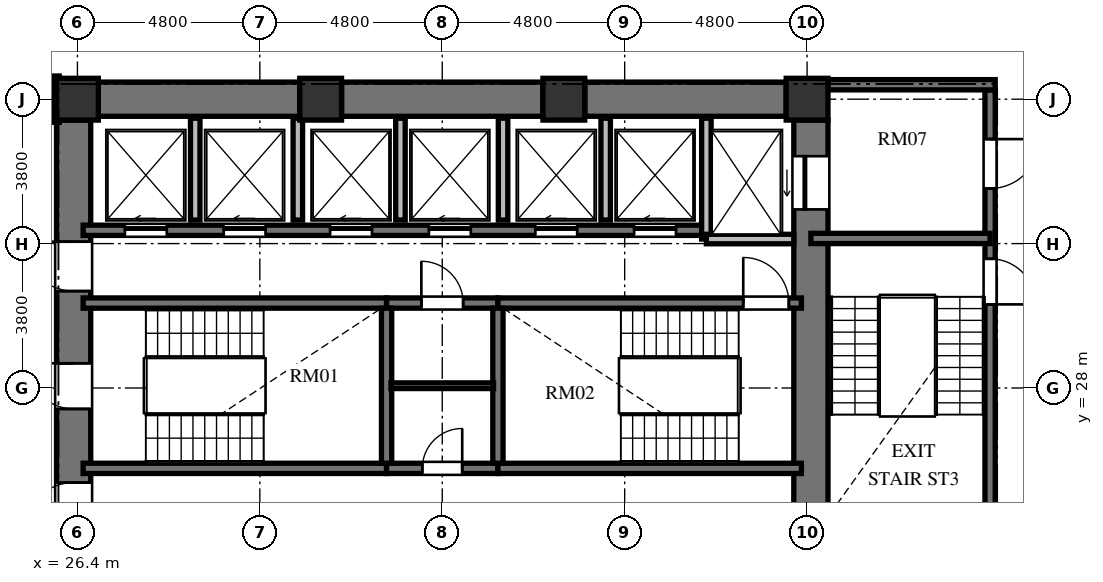
"""IFC4 building model, lengths in metres.
Left out: names, types, materials, properties, quantities, classifications, styles, units other than length and angle.
Written with IfcOpenShell. Run it as: python <this file> out.ifc"""

import sys

from ifc_helpers import new_model, si_unit, direction, frame, frame_2d, origin, origin_2d, place, context, subcontext, project, spatial, rectangle, extrude, element, fill, save


model = new_model("IFC4")
c1 = context("Model", 3, precision=1e-05, world=origin(), true_north=direction((0.0, 1.0)))
c2 = subcontext(c1, "Body", "Model", "MODEL_VIEW")
j1 = project(units=[si_unit("LENGTHUNIT", "METRE"), si_unit("PLANEANGLEUNIT", "RADIAN")], contexts=[c1])
p1 = place(None, origin())
s1 = spatial("IfcSite", under=j1, at=p1, CompositionType="ELEMENT")
p2 = place(p1, origin())
s2 = spatial("IfcBuilding", under=s1, at=p2, CompositionType="ELEMENT")
p3 = place(p2, frame((0.0, 0.0, 36.144)))
s3 = spatial("IfcBuildingStorey", under=s2, at=p3, CompositionType="ELEMENT", Elevation=36.144)
for number, where, z_axis, x_axis in (
    (1, (45.6, 35.6, 0.0), (0.0, 0.0, 1.0), (1.0, 0.0, 0.0)),
    (2, (39.2, 35.6, 0.0), (0.0, 0.0, 1.0), (1.0, 0.0, 0.0)),
    (3, (32.8, 35.6, 0.0), (0.0, 0.0, 1.0), (1.0, 0.0, 0.0)),
    (4, (26.4, 35.6, 0.0), (0.0, 0.0, 1.0), (1.0, 0.0, 0.0)),
):
    element("IfcColumn", number, at=place(p3, frame(where, z_axis=z_axis, x_axis=x_axis)), inside=s3, PredefinedType="COLUMN", context=c2, shape_type="SweptSolid", body=[
        extrude(rectangle(XDim=1.1, YDim=1.1, at=origin_2d()), origin(), (0.0, 0.0, 1.0), 3.648),
    ])
p4 = place(p3, frame((26.3, 20.95, 0.0), z_axis=(0.0, 0.0, 1.0), x_axis=(0.0, 1.0, 0.0)))
e5 = element("IfcWall", 5, at=p4, inside=s3, PredefinedType="SHEAR", context=c2, shape_type="SweptSolid", body=[
    extrude(rectangle(XDim=14.1, YDim=0.9, at=frame_2d((7.05, 0.0))), origin(), (0.0, 0.0, 1.0), 3.648),
])
p5 = place(p4, frame((6.5, 0.0, 0.0)))
e6 = element("IfcOpeningElement", 6, at=p5, cuts=e5, PredefinedType="OPENING", context=c2, shape_type="SweptSolid", body=[
    extrude(rectangle(XDim=1.2, YDim=2.15, at=frame_2d((0.6, 1.075))), frame((0.0, 0.46, 0.0), z_axis=(0.0, -1.0, 0.0), x_axis=(1.0, 0.0, 0.0)), (0.0, 0.0, 1.0), 0.92),
])
p6 = place(p4, frame((9.6, 0.0, 0.0)))
e7 = element("IfcOpeningElement", 7, at=p6, cuts=e5, PredefinedType="OPENING", context=c2, shape_type="SweptSolid", body=[
    extrude(rectangle(XDim=1.3, YDim=2.2, at=frame_2d((0.65, 1.1))), frame((0.0, 0.46, 0.0), z_axis=(0.0, -1.0, 0.0), x_axis=(1.0, 0.0, 0.0)), (0.0, 0.0, 1.0), 0.92),
])
p7 = place(p4, frame((3.26, 0.0, 0.0)))
e8 = element("IfcOpeningElement", 8, at=p7, cuts=e5, PredefinedType="OPENING", context=c2, shape_type="SweptSolid", body=[
    extrude(rectangle(XDim=1.3, YDim=2.2, at=frame_2d((0.65, 1.1))), frame((0.0, 0.46, 0.0), z_axis=(0.0, -1.0, 0.0), x_axis=(1.0, 0.0, 0.0)), (0.0, 0.0, 1.0), 0.92),
])
p8 = place(p3, frame((45.7, 20.95, 0.0), z_axis=(0.0, 0.0, 1.0), x_axis=(0.0, 1.0, 0.0)))
e9 = element("IfcWall", 9, at=p8, inside=s3, PredefinedType="SHEAR", context=c2, shape_type="SweptSolid", body=[
    extrude(rectangle(XDim=14.1, YDim=0.9, at=frame_2d((7.05, 0.0))), origin(), (0.0, 0.0, 1.0), 3.648),
])
p9 = place(p8, frame((11.75, 0.0, 0.0)))
e10 = element("IfcOpeningElement", 10, at=p9, cuts=e9, PredefinedType="OPENING", context=c2, shape_type="SweptSolid", body=[
    extrude(rectangle(XDim=1.4, YDim=2.3, at=frame_2d((0.7, 1.15))), frame((0.0, 0.46, 0.0), z_axis=(0.0, -1.0, 0.0), x_axis=(1.0, 0.0, 0.0)), (0.0, 0.0, 1.0), 0.92),
])
p10 = place(p8, frame((0.95, 0.0, 0.0)))
e11 = element("IfcOpeningElement", 11, at=p10, cuts=e9, PredefinedType="OPENING", context=c2, shape_type="SweptSolid", body=[
    extrude(rectangle(XDim=1.4, YDim=2.3, at=frame_2d((0.7, 1.15))), frame((0.0, 0.46, 0.0), z_axis=(0.0, -1.0, 0.0), x_axis=(1.0, 0.0, 0.0)), (0.0, 0.0, 1.0), 0.92),
])
p11 = place(p3, frame((26.95, 35.6, 0.0), z_axis=(0.0, 0.0, 1.0), x_axis=(1.0, 0.0, 0.0)))
e12 = element("IfcWall", 12, at=p11, inside=s3, PredefinedType="SHEAR", context=c2, shape_type="SweptSolid", body=[
    extrude(rectangle(XDim=5.3, YDim=0.9, at=frame_2d((2.65, 0.0))), origin(), (0.0, 0.0, 1.0), 3.648),
])
p12 = place(p3, frame((33.35, 35.6, 0.0), z_axis=(0.0, 0.0, 1.0), x_axis=(1.0, 0.0, 0.0)))
e13 = element("IfcWall", 13, at=p12, inside=s3, PredefinedType="SHEAR", context=c2, shape_type="SweptSolid", body=[
    extrude(rectangle(XDim=5.3, YDim=0.9, at=frame_2d((2.65, 0.0))), origin(), (0.0, 0.0, 1.0), 3.648),
])
p13 = place(p3, frame((39.75, 35.6, 0.0), z_axis=(0.0, 0.0, 1.0), x_axis=(1.0, 0.0, 0.0)))
e14 = element("IfcWall", 14, at=p13, inside=s3, PredefinedType="SHEAR", context=c2, shape_type="SweptSolid", body=[
    extrude(rectangle(XDim=5.3, YDim=0.9, at=frame_2d((2.65, 0.0))), origin(), (0.0, 0.0, 1.0), 3.648),
])
p14 = place(p3, frame((26.55, 30.235, 0.0), z_axis=(0.0, 0.0, 1.0), x_axis=(1.0, 0.0, 0.0)))
e15 = element("IfcWall", 15, at=p14, inside=s3, PredefinedType="SHEAR", context=c2, shape_type="SweptSolid", body=[
    extrude(rectangle(XDim=7.985, YDim=0.27, at=frame_2d((3.992, 0.0))), origin(), (0.0, 0.0, 1.0), 3.648),
])
p15 = place(p3, frame((34.535, 30.235, 0.0), z_axis=(0.0, 0.0, 1.0), x_axis=(1.0, 0.0, 0.0)))
e16 = element("IfcWall", 16, at=p15, inside=s3, PredefinedType="SHEAR", context=c2, shape_type="SweptSolid", body=[
    extrude(rectangle(XDim=2.93, YDim=0.27, at=frame_2d((1.465, 0.0))), origin(), (0.0, 0.0, 1.0), 3.648),
])
p16 = place(p15, frame((0.915, 0.0, 0.0)))
e17 = element("IfcOpeningElement", 17, at=p16, cuts=e16, PredefinedType="OPENING", context=c2, shape_type="SweptSolid", body=[
    extrude(rectangle(XDim=1.1, YDim=2.15, at=frame_2d((0.55, 1.075))), frame((0.0, 0.145, 0.0), z_axis=(0.0, -1.0, 0.0), x_axis=(1.0, 0.0, 0.0)), (0.0, 0.0, 1.0), 0.29),
])
p17 = place(p3, frame((37.465, 30.235, 0.0), z_axis=(0.0, 0.0, 1.0), x_axis=(1.0, 0.0, 0.0)))
e18 = element("IfcWall", 18, at=p17, inside=s3, PredefinedType="SHEAR", context=c2, shape_type="SweptSolid", body=[
    extrude(rectangle(XDim=7.985, YDim=0.27, at=frame_2d((3.992, 0.0))), origin(), (0.0, 0.0, 1.0), 3.648),
])
p18 = place(p17, frame((6.455, 0.0, 0.0)))
e19 = element("IfcOpeningElement", 19, at=p18, cuts=e18, PredefinedType="OPENING", context=c2, shape_type="SweptSolid", body=[
    extrude(rectangle(XDim=1.2, YDim=2.15, at=frame_2d((0.6, 1.075))), frame((0.0, 0.145, 0.0), z_axis=(0.0, -1.0, 0.0), x_axis=(1.0, 0.0, 0.0)), (0.0, 0.0, 1.0), 0.29),
])
p19 = place(p3, frame((26.55, 25.885, 0.0), z_axis=(0.0, 0.0, 1.0), x_axis=(1.0, 0.0, 0.0)))
e20 = element("IfcWall", 20, at=p19, inside=s3, PredefinedType="SHEAR", context=c2, shape_type="SweptSolid", body=[
    extrude(rectangle(XDim=7.985, YDim=0.27, at=frame_2d((3.992, 0.0))), origin(), (0.0, 0.0, 1.0), 3.648),
])
p20 = place(p3, frame((34.535, 25.885, 0.0), z_axis=(0.0, 0.0, 1.0), x_axis=(1.0, 0.0, 0.0)))
e21 = element("IfcWall", 21, at=p20, inside=s3, PredefinedType="SHEAR", context=c2, shape_type="SweptSolid", body=[
    extrude(rectangle(XDim=2.93, YDim=0.27, at=frame_2d((1.465, 0.0))), origin(), (0.0, 0.0, 1.0), 3.648),
])
p21 = place(p20, frame((0.94, 0.0, 0.0)))
e22 = element("IfcOpeningElement", 22, at=p21, cuts=e21, PredefinedType="OPENING", context=c2, shape_type="SweptSolid", body=[
    extrude(rectangle(XDim=1.05, YDim=2.15, at=frame_2d((0.525, 1.075))), frame((0.0, 0.145, 0.0), z_axis=(0.0, -1.0, 0.0), x_axis=(1.0, 0.0, 0.0)), (0.0, 0.0, 1.0), 0.29),
])
p22 = place(p3, frame((37.465, 25.885, 0.0), z_axis=(0.0, 0.0, 1.0), x_axis=(1.0, 0.0, 0.0)))
e23 = element("IfcWall", 23, at=p22, inside=s3, PredefinedType="SHEAR", context=c2, shape_type="SweptSolid", body=[
    extrude(rectangle(XDim=7.985, YDim=0.27, at=frame_2d((3.992, 0.0))), origin(), (0.0, 0.0, 1.0), 3.648),
])
for number, where, z_axis, x_axis in (
    (24, (34.535, 26.02, 0.0), (0.0, 0.0, 1.0), (0.0, 1.0, 0.0)),
    (25, (37.465, 26.02, 0.0), (0.0, 0.0, 1.0), (0.0, 1.0, 0.0)),
):
    element("IfcWall", number, at=place(p3, frame(where, z_axis=z_axis, x_axis=x_axis)), inside=s3, PredefinedType="SHEAR", context=c2, shape_type="SweptSolid", body=[
        extrude(rectangle(XDim=4.08, YDim=0.27, at=frame_2d((2.04, 0.0))), origin(), (0.0, 0.0, 1.0), 3.648),
    ])
p23 = place(p3, frame((34.65, 28.06, 0.0), z_axis=(0.0, 0.0, 1.0), x_axis=(1.0, 0.0, 0.0)))
e26 = element("IfcWall", 26, at=p23, inside=s3, PredefinedType="PARTITIONING", context=c2, shape_type="SweptSolid", body=[
    extrude(rectangle(XDim=2.7, YDim=0.15, at=frame_2d((1.35, 0.0))), origin(), (0.0, 0.0, 1.0), 3.428),
])
p24 = place(p3, frame((26.55, 32.15, 0.0), z_axis=(0.0, 0.0, 1.0), x_axis=(1.0, 0.0, 0.0)))
e27 = element("IfcWall", 27, at=p24, inside=s3, PredefinedType="SHEAR", context=c2, shape_type="SweptSolid", body=[
    extrude(rectangle(XDim=16.4, YDim=0.27, at=frame_2d((8.2, 0.0))), origin(), (0.0, 0.0, 1.0), 3.648),
])
p25 = place(p24, frame((1.1, 0.0, 0.0)))
e28 = element("IfcOpeningElement", 28, at=p25, cuts=e27, PredefinedType="OPENING", context=c2, shape_type="SweptSolid", body=[
    extrude(rectangle(XDim=1.1, YDim=2.2, at=frame_2d((0.55, 1.1))), frame((0.0, 0.145, 0.0), z_axis=(0.0, -1.0, 0.0), x_axis=(1.0, 0.0, 0.0)), (0.0, 0.0, 1.0), 0.29),
])
p26 = place(p24, frame((3.7, 0.0, 0.0)))
e29 = element("IfcOpeningElement", 29, at=p26, cuts=e27, PredefinedType="OPENING", context=c2, shape_type="SweptSolid", body=[
    extrude(rectangle(XDim=1.1, YDim=2.2, at=frame_2d((0.55, 1.1))), frame((0.0, 0.145, 0.0), z_axis=(0.0, -1.0, 0.0), x_axis=(1.0, 0.0, 0.0)), (0.0, 0.0, 1.0), 0.29),
])
p27 = place(p24, frame((6.5, 0.0, 0.0)))
e30 = element("IfcOpeningElement", 30, at=p27, cuts=e27, PredefinedType="OPENING", context=c2, shape_type="SweptSolid", body=[
    extrude(rectangle(XDim=1.1, YDim=2.2, at=frame_2d((0.55, 1.1))), frame((0.0, 0.145, 0.0), z_axis=(0.0, -1.0, 0.0), x_axis=(1.0, 0.0, 0.0)), (0.0, 0.0, 1.0), 0.29),
])
p28 = place(p24, frame((9.1, 0.0, 0.0)))
e31 = element("IfcOpeningElement", 31, at=p28, cuts=e27, PredefinedType="OPENING", context=c2, shape_type="SweptSolid", body=[
    extrude(rectangle(XDim=1.1, YDim=2.2, at=frame_2d((0.55, 1.1))), frame((0.0, 0.145, 0.0), z_axis=(0.0, -1.0, 0.0), x_axis=(1.0, 0.0, 0.0)), (0.0, 0.0, 1.0), 0.29),
])
p29 = place(p24, frame((11.9, 0.0, 0.0)))
e32 = element("IfcOpeningElement", 32, at=p29, cuts=e27, PredefinedType="OPENING", context=c2, shape_type="SweptSolid", body=[
    extrude(rectangle(XDim=1.1, YDim=2.2, at=frame_2d((0.55, 1.1))), frame((0.0, 0.145, 0.0), z_axis=(0.0, -1.0, 0.0), x_axis=(1.0, 0.0, 0.0)), (0.0, 0.0, 1.0), 0.29),
])
p30 = place(p24, frame((14.5, 0.0, 0.0)))
e33 = element("IfcOpeningElement", 33, at=p30, cuts=e27, PredefinedType="OPENING", context=c2, shape_type="SweptSolid", body=[
    extrude(rectangle(XDim=1.1, YDim=2.2, at=frame_2d((0.55, 1.1))), frame((0.0, 0.145, 0.0), z_axis=(0.0, -1.0, 0.0), x_axis=(1.0, 0.0, 0.0)), (0.0, 0.0, 1.0), 0.29),
])
p31 = place(p3, frame((42.95, 31.92, 0.0), z_axis=(0.0, 0.0, 1.0), x_axis=(0.0, 1.0, 0.0)))
e34 = element("IfcWall", 34, at=p31, inside=s3, PredefinedType="SOLIDWALL", context=c2, shape_type="SweptSolid", body=[
    extrude(rectangle(XDim=3.18, YDim=0.25, at=frame_2d((1.59, 0.0))), origin(), (0.0, 0.0, 1.0), 3.428),
])
p32 = place(p3, frame((42.95, 31.92, 0.0), z_axis=(0.0, 0.0, 1.0), x_axis=(1.0, 0.0, 0.0)))
e35 = element("IfcWall", 35, at=p32, inside=s3, PredefinedType="SOLIDWALL", context=c2, shape_type="SweptSolid", body=[
    extrude(rectangle(XDim=2.3, YDim=0.25, at=frame_2d((1.15, 0.0))), origin(), (0.0, 0.0, 1.0), 3.428),
])
for number, where, z_axis, x_axis in (
    (36, (29.5, 32.42, 0.0), (0.0, 0.0, 1.0), (0.0, 1.0, 0.0)),
    (37, (32.2, 32.42, 0.0), (0.0, 0.0, 1.0), (0.0, 1.0, 0.0)),
    (38, (34.9, 32.42, 0.0), (0.0, 0.0, 1.0), (0.0, 1.0, 0.0)),
    (39, (37.6, 32.42, 0.0), (0.0, 0.0, 1.0), (0.0, 1.0, 0.0)),
    (40, (40.3, 32.42, 0.0), (0.0, 0.0, 1.0), (0.0, 1.0, 0.0)),
):
    element("IfcWall", number, at=place(p3, frame(where, z_axis=z_axis, x_axis=x_axis)), inside=s3, PredefinedType="SOLIDWALL", context=c2, shape_type="SweptSolid", body=[
        extrude(rectangle(XDim=2.68, YDim=0.25, at=frame_2d((1.34, 0.0))), origin(), (0.0, 0.0, 1.0), 3.428),
    ])
p33 = place(p3, frame((50.415, 35.845, 0.0), z_axis=(0.0, 0.0, 1.0), x_axis=(0.0, -1.0, 0.0)))
e41 = element("IfcWall", 41, at=p33, inside=s3, PredefinedType="SHEAR", context=c2, shape_type="SweptSolid", body=[
    extrude(rectangle(XDim=15.825, YDim=0.27, at=frame_2d((7.913, 0.0))), origin(), (0.0, 0.0, 1.0), 3.648),
])
p34 = place(p33, frame((4.445, 0.0, 0.0)))
e42 = element("IfcOpeningElement", 42, at=p34, cuts=e41, PredefinedType="OPENING", context=c2, shape_type="SweptSolid", body=[
    extrude(rectangle(XDim=1.2, YDim=2.15, at=frame_2d((0.6, 1.075))), frame((0.0, 0.145, 0.0), z_axis=(0.0, -1.0, 0.0), x_axis=(1.0, 0.0, 0.0)), (0.0, 0.0, 1.0), 0.29),
])
p35 = place(p33, frame((1.295, 0.0, 0.0)))
e43 = element("IfcOpeningElement", 43, at=p35, cuts=e41, PredefinedType="OPENING", context=c2, shape_type="SweptSolid", body=[
    extrude(rectangle(XDim=1.3, YDim=2.2, at=frame_2d((0.65, 1.1))), frame((0.0, 0.145, 0.0), z_axis=(0.0, -1.0, 0.0), x_axis=(1.0, 0.0, 0.0)), (0.0, 0.0, 1.0), 0.29),
])
p36 = place(p33, frame((13.095, 0.0, 0.0)))
e44 = element("IfcOpeningElement", 44, at=p36, cuts=e41, PredefinedType="OPENING", context=c2, shape_type="SweptSolid", body=[
    extrude(rectangle(XDim=1.3, YDim=2.2, at=frame_2d((0.65, 1.1))), frame((0.0, 0.145, 0.0), z_axis=(0.0, -1.0, 0.0), x_axis=(1.0, 0.0, 0.0)), (0.0, 0.0, 1.0), 0.29),
])
p37 = place(p3, frame((46.15, 35.98, 0.0), z_axis=(0.0, 0.0, 1.0), x_axis=(1.0, 0.0, 0.0)))
e45 = element("IfcWall", 45, at=p37, inside=s3, PredefinedType="SHEAR", context=c2, shape_type="SweptSolid", body=[
    extrude(rectangle(XDim=4.4, YDim=0.27, at=frame_2d((2.2, 0.0))), origin(), (0.0, 0.0, 1.0), 3.648),
])
p38 = place(p3, frame((45.7, 31.935, 0.0), z_axis=(0.0, 0.0, 1.0), x_axis=(1.0, 0.0, 0.0)))
e46 = element("IfcWall", 46, at=p38, inside=s3, PredefinedType="SHEAR", context=c2, shape_type="SweptSolid", body=[
    extrude(rectangle(XDim=4.715, YDim=0.27, at=frame_2d((2.357, 0.0))), origin(), (0.0, 0.0, 1.0), 3.648),
])
p39 = place(p3, frame((25.83, 36.21, 0.0), z_axis=(0.0, 0.0, 1.0), x_axis=(0.0, -1.0, 0.0)))
e47 = element("IfcWall", 47, at=p39, inside=s3, PredefinedType="PARTITIONING", context=c2, shape_type="SweptSolid", body=[
    extrude(rectangle(XDim=1.22, YDim=0.18, at=frame_2d((0.61, 0.0))), origin(), (0.0, 0.0, 1.0), 3.428),
])
p40 = place(p5, origin())
e48 = element("IfcDoor", 48, at=p40, inside=s3, OperationType="SINGLE_SWING_RIGHT", PredefinedType="DOOR", context=c2, shape_type="SweptSolid", body=[
    extrude(rectangle(XDim=1.2, YDim=2.15, at=frame_2d((0.6, 1.075))), frame((0.0, 0.025, 0.0), z_axis=(0.0, -1.0, 0.0), x_axis=(1.0, 0.0, 0.0)), (0.0, 0.0, 1.0), 0.05),
])
fill(e6, e48)
p41 = place(p18, origin())
e49 = element("IfcDoor", 49, at=p41, inside=s3, OperationType="SINGLE_SWING_LEFT", PredefinedType="DOOR", context=c2, shape_type="SweptSolid", body=[
    extrude(rectangle(XDim=1.2, YDim=2.15, at=frame_2d((0.6, 1.075))), frame((0.0, 0.025, 0.0), z_axis=(0.0, -1.0, 0.0), x_axis=(1.0, 0.0, 0.0)), (0.0, 0.0, 1.0), 0.05),
])
fill(e19, e49)
p42 = place(p21, origin())
e50 = element("IfcDoor", 50, at=p42, inside=s3, OperationType="SINGLE_SWING_RIGHT", PredefinedType="DOOR", context=c2, shape_type="SweptSolid", body=[
    extrude(rectangle(XDim=1.05, YDim=2.15, at=frame_2d((0.525, 1.075))), frame((0.0, 0.025, 0.0), z_axis=(0.0, -1.0, 0.0), x_axis=(1.0, 0.0, 0.0)), (0.0, 0.0, 1.0), 0.05),
])
fill(e22, e50)
p43 = place(p16, origin())
e51 = element("IfcDoor", 51, at=p43, inside=s3, OperationType="SINGLE_SWING_LEFT", PredefinedType="DOOR", context=c2, shape_type="SweptSolid", body=[
    extrude(rectangle(XDim=1.1, YDim=2.15, at=frame_2d((0.55, 1.075))), frame((0.0, 0.025, 0.0), z_axis=(0.0, -1.0, 0.0), x_axis=(1.0, 0.0, 0.0)), (0.0, 0.0, 1.0), 0.05),
])
fill(e17, e51)
p44 = place(p6, origin())
e52 = element("IfcDoor", 52, at=p44, inside=s3, OperationType="SINGLE_SWING_RIGHT", PredefinedType="DOOR", context=c2, shape_type="SweptSolid", body=[
    extrude(rectangle(XDim=1.3, YDim=2.2, at=frame_2d((0.65, 1.1))), frame((0.0, 0.025, 0.0), z_axis=(0.0, -1.0, 0.0), x_axis=(1.0, 0.0, 0.0)), (0.0, 0.0, 1.0), 0.05),
])
fill(e7, e52)
p45 = place(p7, origin())
e53 = element("IfcDoor", 53, at=p45, inside=s3, OperationType="SINGLE_SWING_LEFT", PredefinedType="DOOR", context=c2, shape_type="SweptSolid", body=[
    extrude(rectangle(XDim=1.3, YDim=2.2, at=frame_2d((0.65, 1.1))), frame((0.0, 0.025, 0.0), z_axis=(0.0, -1.0, 0.0), x_axis=(1.0, 0.0, 0.0)), (0.0, 0.0, 1.0), 0.05),
])
fill(e8, e53)
p46 = place(p25, origin())
e54 = element("IfcDoor", 54, at=p46, inside=s3, OperationType="SLIDING_TO_LEFT", PredefinedType="DOOR", context=c2, shape_type="SweptSolid", body=[
    extrude(rectangle(XDim=1.1, YDim=2.2, at=frame_2d((0.55, 1.1))), frame((0.0, 0.025, 0.0), z_axis=(0.0, -1.0, 0.0), x_axis=(1.0, 0.0, 0.0)), (0.0, 0.0, 1.0), 0.05),
])
fill(e28, e54)
p47 = place(p26, origin())
e55 = element("IfcDoor", 55, at=p47, inside=s3, OperationType="SLIDING_TO_LEFT", PredefinedType="DOOR", context=c2, shape_type="SweptSolid", body=[
    extrude(rectangle(XDim=1.1, YDim=2.2, at=frame_2d((0.55, 1.1))), frame((0.0, 0.025, 0.0), z_axis=(0.0, -1.0, 0.0), x_axis=(1.0, 0.0, 0.0)), (0.0, 0.0, 1.0), 0.05),
])
fill(e29, e55)
p48 = place(p27, origin())
e56 = element("IfcDoor", 56, at=p48, inside=s3, OperationType="SLIDING_TO_LEFT", PredefinedType="DOOR", context=c2, shape_type="SweptSolid", body=[
    extrude(rectangle(XDim=1.1, YDim=2.2, at=frame_2d((0.55, 1.1))), frame((0.0, 0.025, 0.0), z_axis=(0.0, -1.0, 0.0), x_axis=(1.0, 0.0, 0.0)), (0.0, 0.0, 1.0), 0.05),
])
fill(e30, e56)
p49 = place(p28, origin())
e57 = element("IfcDoor", 57, at=p49, inside=s3, OperationType="SLIDING_TO_LEFT", PredefinedType="DOOR", context=c2, shape_type="SweptSolid", body=[
    extrude(rectangle(XDim=1.1, YDim=2.2, at=frame_2d((0.55, 1.1))), frame((0.0, 0.025, 0.0), z_axis=(0.0, -1.0, 0.0), x_axis=(1.0, 0.0, 0.0)), (0.0, 0.0, 1.0), 0.05),
])
fill(e31, e57)
p50 = place(p29, origin())
e58 = element("IfcDoor", 58, at=p50, inside=s3, OperationType="SLIDING_TO_LEFT", PredefinedType="DOOR", context=c2, shape_type="SweptSolid", body=[
    extrude(rectangle(XDim=1.1, YDim=2.2, at=frame_2d((0.55, 1.1))), frame((0.0, 0.025, 0.0), z_axis=(0.0, -1.0, 0.0), x_axis=(1.0, 0.0, 0.0)), (0.0, 0.0, 1.0), 0.05),
])
fill(e32, e58)
p51 = place(p30, origin())
e59 = element("IfcDoor", 59, at=p51, inside=s3, OperationType="SLIDING_TO_LEFT", PredefinedType="DOOR", context=c2, shape_type="SweptSolid", body=[
    extrude(rectangle(XDim=1.1, YDim=2.2, at=frame_2d((0.55, 1.1))), frame((0.0, 0.025, 0.0), z_axis=(0.0, -1.0, 0.0), x_axis=(1.0, 0.0, 0.0)), (0.0, 0.0, 1.0), 0.05),
])
fill(e33, e59)
p52 = place(p9, origin())
e60 = element("IfcDoor", 60, at=p52, inside=s3, OperationType="SLIDING_TO_LEFT", PredefinedType="DOOR", context=c2, shape_type="SweptSolid", body=[
    extrude(rectangle(XDim=1.4, YDim=2.3, at=frame_2d((0.7, 1.15))), frame((0.0, 0.025, 0.0), z_axis=(0.0, -1.0, 0.0), x_axis=(1.0, 0.0, 0.0)), (0.0, 0.0, 1.0), 0.05),
])
fill(e10, e60)
p53 = place(p34, origin())
e61 = element("IfcDoor", 61, at=p53, inside=s3, OperationType="SINGLE_SWING_RIGHT", PredefinedType="DOOR", context=c2, shape_type="SweptSolid", body=[
    extrude(rectangle(XDim=1.2, YDim=2.15, at=frame_2d((0.6, 1.075))), frame((0.0, 0.025, 0.0), z_axis=(0.0, -1.0, 0.0), x_axis=(1.0, 0.0, 0.0)), (0.0, 0.0, 1.0), 0.05),
])
fill(e42, e61)
p54 = place(p35, origin())
e62 = element("IfcDoor", 62, at=p54, inside=s3, OperationType="SINGLE_SWING_LEFT", PredefinedType="DOOR", context=c2, shape_type="SweptSolid", body=[
    extrude(rectangle(XDim=1.3, YDim=2.2, at=frame_2d((0.65, 1.1))), frame((0.0, 0.025, 0.0), z_axis=(0.0, -1.0, 0.0), x_axis=(1.0, 0.0, 0.0)), (0.0, 0.0, 1.0), 0.05),
])
fill(e43, e62)
save(model, sys.argv[1])
